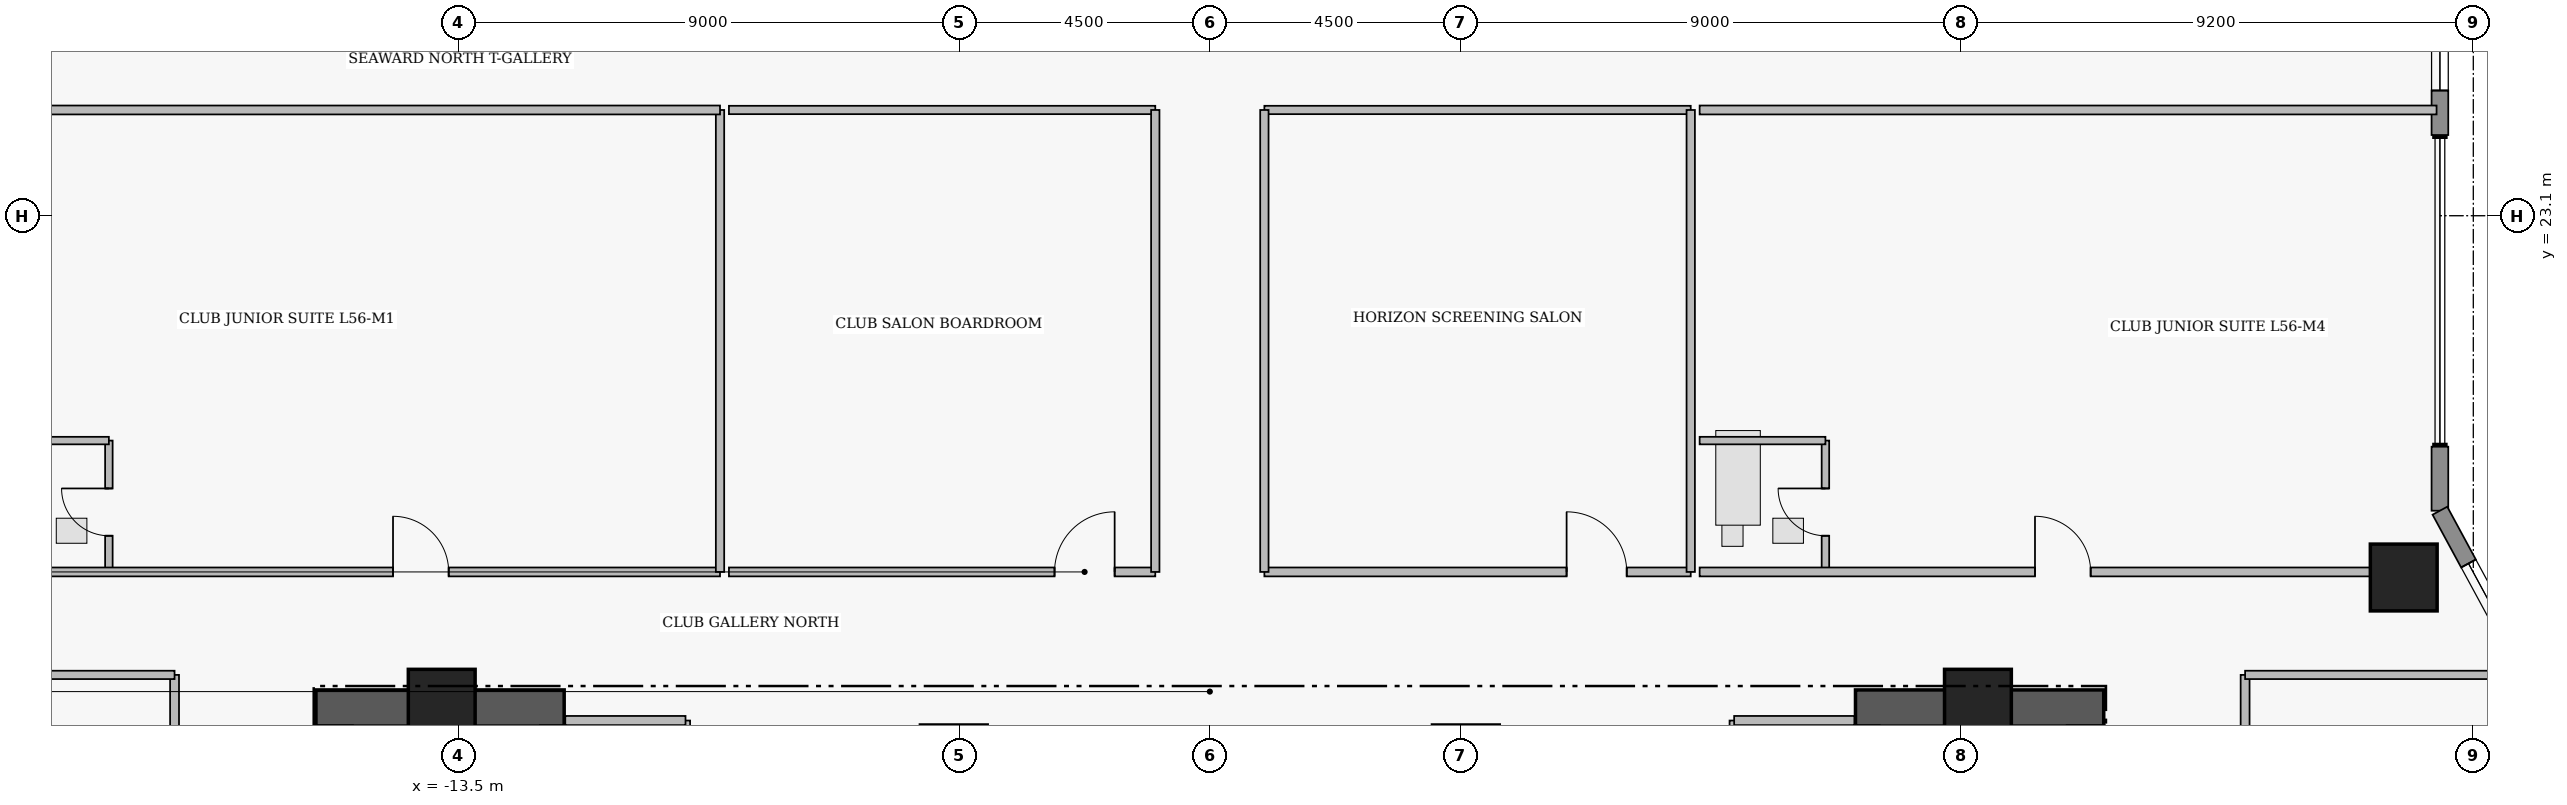
"""IFC4 building model, lengths in metres.
Left out: names, types, materials, properties, quantities, classifications, styles, units other than length and angle.
Written with IfcOpenShell. Run it as: python <this file> out.ifc"""

import sys

from ifc_helpers import new_model, si_unit, direction, frame, frame_2d, origin, origin_2d, place, context, subcontext, project, spatial, rectangle, extrude, element, fill, save


model = new_model("IFC4")
c1 = context("Model", 3, precision=1e-05, world=origin(), true_north=direction((0.0, 1.0)))
c2 = subcontext(c1, "Body", "Model", "MODEL_VIEW")
j1 = project(units=[si_unit("LENGTHUNIT", "METRE"), si_unit("PLANEANGLEUNIT", "RADIAN")], contexts=[c1])
p1 = place(None, origin())
s1 = spatial("IfcSite", under=j1, at=p1, CompositionType="ELEMENT")
p2 = place(p1, origin())
s2 = spatial("IfcBuilding", under=s1, at=p2, CompositionType="ELEMENT")
p3 = place(p2, frame((0.0, 0.0, 222.4)))
s3 = spatial("IfcBuildingStorey", under=s2, at=p3, CompositionType="ELEMENT", Elevation=222.4)
for number, where, z_axis, x_axis in (
    (1, (-16.06, 14.255, 0.0), (0.0, 0.0, 1.0), (1.0, 0.0, 0.0)),
    (2, (11.6, 14.255, 0.0), (0.0, 0.0, 1.0), (1.0, 0.0, 0.0)),
):
    element("IfcWall", number, at=place(p3, frame(where, z_axis=z_axis, x_axis=x_axis)), inside=s3, PredefinedType="SHEAR", context=c2, shape_type="SweptSolid", body=[
        extrude(rectangle(XDim=4.46, YDim=0.65, at=frame_2d((2.23, 0.0))), origin(), (0.0, 0.0, 1.0), 3.56),
    ])
for number, where, z_axis, x_axis in (
    (3, (-13.8, 14.35, 0.0), (0.0, 0.0, 1.0), (1.0, 0.0, 0.0)),
    (4, (-4.6, 13.35, 0.0), (0.0, 0.0, 1.0), (1.0, 0.0, 0.0)),
    (5, (4.6, 13.35, 0.0), (0.0, 0.0, 1.0), (1.0, 0.0, 0.0)),
    (6, (13.8, 14.35, 0.0), (0.0, 0.0, 1.0), (1.0, 0.0, 0.0)),
    (7, (21.45, 16.6, 0.0), (0.0, 0.0, 1.0), (1.0, 0.0, 0.0)),
):
    element("IfcColumn", number, at=place(p3, frame(where, z_axis=z_axis, x_axis=x_axis)), inside=s3, PredefinedType="COLUMN", context=c2, shape_type="SweptSolid", body=[
        extrude(rectangle(XDim=1.2, YDim=1.2, at=origin_2d()), origin(), (0.0, 0.0, 1.0), 3.75),
    ])
p4 = place(p3, frame((22.1, 30.2, 0.0), z_axis=(0.0, 0.0, 1.0), x_axis=(0.0, -1.0, 0.0)))
e8 = element("IfcWall", 8, at=p4, inside=s3, PredefinedType="STANDARD", context=c2, shape_type="SweptSolid", body=[
    extrude(rectangle(XDim=5.65, YDim=0.3, at=frame_2d((2.825, 0.0))), origin(), (0.0, 0.0, 1.0), 3.53),
])
p5 = place(p4, frame((0.935, 0.0, 0.85)))
e9 = element("IfcOpeningElement", 9, at=p5, cuts=e8, PredefinedType="OPENING", context=c2, shape_type="SweptSolid", body=[
    extrude(rectangle(XDim=1.6, YDim=1.8, at=frame_2d((0.8, 0.9))), frame((0.0, 0.16, 0.0), z_axis=(0.0, -1.0, 0.0), x_axis=(1.0, 0.0, 0.0)), (0.0, 0.0, 1.0), 0.32),
])
p6 = place(p4, frame((3.7, 0.0, 0.95)))
e10 = element("IfcOpeningElement", 10, at=p6, cuts=e8, PredefinedType="OPENING", context=c2, shape_type="SweptSolid", body=[
    extrude(rectangle(XDim=1.15, YDim=1.55, at=frame_2d((0.575, 0.775))), frame((0.0, 0.16, 0.0), z_axis=(0.0, -1.0, 0.0), x_axis=(1.0, 0.0, 0.0)), (0.0, 0.0, 1.0), 0.32),
])
p7 = place(p3, frame((22.1, 18.95, 0.0), z_axis=(0.0, 0.0, 1.0), x_axis=(0.0, -1.0, 0.0)))
e11 = element("IfcWall", 11, at=p7, inside=s3, PredefinedType="STANDARD", context=c2, shape_type="SweptSolid", body=[
    extrude(rectangle(XDim=1.15, YDim=0.3, at=frame_2d((0.575, 0.0))), origin(), (0.0, 0.0, 1.0), 3.53),
])
p8 = place(p3, frame((22.1, 17.8, 0.0), z_axis=(0.0, 0.0, 1.0), x_axis=(0.476258655584, -0.879305233114, 0.0)))
e12 = element("IfcWall", 12, at=p8, inside=s3, PredefinedType="STANDARD", context=c2, shape_type="SweptSolid", body=[
    extrude(rectangle(XDim=5.459, YDim=0.3, at=frame_2d((2.729, 0.0))), origin(), (0.0, 0.0, 1.0), 3.53),
])
p9 = place(p8, frame((1.078, 0.0, 1.25)))
e13 = element("IfcOpeningElement", 13, at=p9, cuts=e12, PredefinedType="OPENING", context=c2, shape_type="SweptSolid", body=[
    extrude(rectangle(XDim=1.15, YDim=1.55, at=frame_2d((0.575, 0.775))), frame((0.0, 0.16, 0.0), z_axis=(0.0, -1.0, 0.0), x_axis=(1.0, 0.0, 0.0)), (0.0, 0.0, 1.0), 0.32),
])
p10 = place(p3, frame((-19.78, 16.7, 0.0), z_axis=(0.0, 0.0, 1.0), x_axis=(0.0, 1.0, 0.0)))
e14 = element("IfcWall", 14, at=p10, inside=s3, PredefinedType="PLUMBINGWALL", context=c2, shape_type="SweptSolid", body=[
    extrude(rectangle(XDim=2.36, YDim=0.135, at=frame_2d((1.18, 0.0))), origin(), (0.0, 0.0, 1.0), 3.53),
])
p11 = place(p10, frame((0.65, 0.0, 0.0)))
e15 = element("IfcOpeningElement", 15, at=p11, cuts=e14, PredefinedType="OPENING", context=c2, shape_type="SweptSolid", body=[
    extrude(rectangle(XDim=0.85, YDim=2.1, at=frame_2d((0.425, 1.05))), frame((0.0, 0.077, 0.0), z_axis=(0.0, -1.0, 0.0), x_axis=(1.0, 0.0, 0.0)), (0.0, 0.0, 1.0), 0.155),
])
p12 = place(p3, frame((-22.04, 16.7, 0.0), z_axis=(0.0, 0.0, 1.0), x_axis=(1.0, 0.0, 0.0)))
e16 = element("IfcWall", 16, at=p12, inside=s3, PredefinedType="PARTITIONING", context=c2, shape_type="SweptSolid", body=[
    extrude(rectangle(XDim=13.24, YDim=0.16, at=frame_2d((6.62, 0.0))), origin(), (0.0, 0.0, 1.0), 3.124),
])
p13 = place(p12, frame((7.365, 0.0, 0.0)))
e17 = element("IfcOpeningElement", 17, at=p13, cuts=e16, PredefinedType="OPENING", context=c2, shape_type="SweptSolid", body=[
    extrude(rectangle(XDim=1.0, YDim=2.15, at=frame_2d((0.5, 1.075))), frame((0.0, 0.09, 0.0), z_axis=(0.0, -1.0, 0.0), x_axis=(1.0, 0.0, 0.0)), (0.0, 0.0, 1.0), 0.18),
])
p14 = place(p3, frame((-8.64, 16.7, 0.0), z_axis=(0.0, 0.0, 1.0), x_axis=(1.0, 0.0, 0.0)))
e18 = element("IfcWall", 18, at=p14, inside=s3, PredefinedType="PARTITIONING", context=c2, shape_type="SweptSolid", body=[
    extrude(rectangle(XDim=7.66, YDim=0.16, at=frame_2d((3.83, 0.0))), origin(), (0.0, 0.0, 1.0), 3.124),
])
p15 = place(p14, frame((5.85, 0.0, 0.0)))
e19 = element("IfcOpeningElement", 19, at=p15, cuts=e18, PredefinedType="OPENING", context=c2, shape_type="SweptSolid", body=[
    extrude(rectangle(XDim=1.08, YDim=2.18, at=frame_2d((0.54, 1.09))), frame((0.0, 0.09, 0.0), z_axis=(0.0, -1.0, 0.0), x_axis=(1.0, 0.0, 0.0)), (0.0, 0.0, 1.0), 0.18),
])
p16 = place(p3, frame((0.98, 16.7, 0.0), z_axis=(0.0, 0.0, 1.0), x_axis=(1.0, 0.0, 0.0)))
e20 = element("IfcWall", 20, at=p16, inside=s3, PredefinedType="PARTITIONING", context=c2, shape_type="SweptSolid", body=[
    extrude(rectangle(XDim=7.66, YDim=0.16, at=frame_2d((3.83, 0.0))), origin(), (0.0, 0.0, 1.0), 3.124),
])
p17 = place(p16, frame((5.43, 0.0, 0.0)))
e21 = element("IfcOpeningElement", 21, at=p17, cuts=e20, PredefinedType="OPENING", context=c2, shape_type="SweptSolid", body=[
    extrude(rectangle(XDim=1.08, YDim=2.18, at=frame_2d((0.54, 1.09))), frame((0.0, 0.09, 0.0), z_axis=(0.0, -1.0, 0.0), x_axis=(1.0, 0.0, 0.0)), (0.0, 0.0, 1.0), 0.18),
])
p18 = place(p3, frame((11.06, 16.7, 0.0), z_axis=(0.0, 0.0, 1.0), x_axis=(0.0, 1.0, 0.0)))
e22 = element("IfcWall", 22, at=p18, inside=s3, PredefinedType="PLUMBINGWALL", context=c2, shape_type="SweptSolid", body=[
    extrude(rectangle(XDim=2.36, YDim=0.135, at=frame_2d((1.18, 0.0))), origin(), (0.0, 0.0, 1.0), 3.53),
])
p19 = place(p18, frame((0.65, 0.0, 0.0)))
e23 = element("IfcOpeningElement", 23, at=p19, cuts=e22, PredefinedType="OPENING", context=c2, shape_type="SweptSolid", body=[
    extrude(rectangle(XDim=0.85, YDim=2.1, at=frame_2d((0.425, 1.05))), frame((0.0, 0.077, 0.0), z_axis=(0.0, -1.0, 0.0), x_axis=(1.0, 0.0, 0.0)), (0.0, 0.0, 1.0), 0.155),
])
p20 = place(p3, frame((8.8, 16.7, 0.0), z_axis=(0.0, 0.0, 1.0), x_axis=(1.0, 0.0, 0.0)))
e24 = element("IfcWall", 24, at=p20, inside=s3, PredefinedType="PARTITIONING", context=c2, shape_type="SweptSolid", body=[
    extrude(rectangle(XDim=13.24, YDim=0.16, at=frame_2d((6.62, 0.0))), origin(), (0.0, 0.0, 1.0), 3.124),
])
p21 = place(p20, frame((6.025, 0.0, 0.0)))
e25 = element("IfcOpeningElement", 25, at=p21, cuts=e24, PredefinedType="OPENING", context=c2, shape_type="SweptSolid", body=[
    extrude(rectangle(XDim=1.0, YDim=2.15, at=frame_2d((0.5, 1.075))), frame((0.0, 0.09, 0.0), z_axis=(0.0, -1.0, 0.0), x_axis=(1.0, 0.0, 0.0)), (0.0, 0.0, 1.0), 0.18),
])
p22 = place(p3, frame((18.6, 7.96, 0.0), z_axis=(0.0, 0.0, 1.0), x_axis=(0.0, 1.0, 0.0)))
e26 = element("IfcWall", 26, at=p22, inside=s3, PredefinedType="PARTITIONING", context=c2, shape_type="SweptSolid", body=[
    extrude(rectangle(XDim=6.89, YDim=0.16, at=frame_2d((3.445, 0.0))), origin(), (0.0, 0.0, 1.0), 3.53),
])
p23 = place(p22, frame((2.985, 0.0, 0.0)))
e27 = element("IfcOpeningElement", 27, at=p23, cuts=e26, PredefinedType="OPENING", context=c2, shape_type="SweptSolid", body=[
    extrude(rectangle(XDim=0.92, YDim=2.12, at=frame_2d((0.46, 1.06))), frame((0.0, 0.09, 0.0), z_axis=(0.0, -1.0, 0.0), x_axis=(1.0, 0.0, 0.0)), (0.0, 0.0, 1.0), 0.18),
])
p24 = place(p3, frame((-18.6, 10.18, 0.0), z_axis=(0.0, 0.0, 1.0), x_axis=(0.0, 1.0, 0.0)))
e28 = element("IfcWall", 28, at=p24, inside=s3, PredefinedType="PARTITIONING", context=c2, shape_type="SweptSolid", body=[
    extrude(rectangle(XDim=4.67, YDim=0.16, at=frame_2d((2.335, 0.0))), origin(), (0.0, 0.0, 1.0), 3.53),
])
p25 = place(p24, frame((1.86, 0.0, 0.0)))
e29 = element("IfcOpeningElement", 29, at=p25, cuts=e28, PredefinedType="OPENING", context=c2, shape_type="SweptSolid", body=[
    extrude(rectangle(XDim=0.95, YDim=2.15, at=frame_2d((0.475, 1.075))), frame((0.0, 0.09, 0.0), z_axis=(0.0, -1.0, 0.0), x_axis=(1.0, 0.0, 0.0)), (0.0, 0.0, 1.0), 0.18),
])
p26 = place(p3, frame((-9.42, 11.07, 0.0), z_axis=(0.0, 0.0, 1.0), x_axis=(0.0, 1.0, 0.0)))
e30 = element("IfcWall", 30, at=p26, inside=s3, PredefinedType="PARTITIONING", context=c2, shape_type="SweptSolid", body=[
    extrude(rectangle(XDim=2.96, YDim=0.165, at=frame_2d((1.48, 0.0))), origin(), (0.0, 0.0, 1.0), 3.53),
])
p27 = place(p3, frame((-11.58, 14.03, 0.0), z_axis=(0.0, 0.0, 1.0), x_axis=(1.0, 0.0, 0.0)))
e31 = element("IfcWall", 31, at=p27, inside=s3, PredefinedType="PARTITIONING", context=c2, shape_type="SweptSolid", body=[
    extrude(rectangle(XDim=2.16, YDim=0.165, at=frame_2d((1.08, 0.0))), origin(), (0.0, 0.0, 1.0), 3.53),
])
p28 = place(p3, frame((9.42, 11.07, 0.0), z_axis=(0.0, 0.0, 1.0), x_axis=(0.0, 1.0, 0.0)))
e32 = element("IfcWall", 32, at=p28, inside=s3, PredefinedType="PARTITIONING", context=c2, shape_type="SweptSolid", body=[
    extrude(rectangle(XDim=2.96, YDim=0.165, at=frame_2d((1.48, 0.0))), origin(), (0.0, 0.0, 1.0), 3.53),
])
p29 = place(p3, frame((9.42, 14.03, 0.0), z_axis=(0.0, 0.0, 1.0), x_axis=(1.0, 0.0, 0.0)))
e33 = element("IfcWall", 33, at=p29, inside=s3, PredefinedType="PARTITIONING", context=c2, shape_type="SweptSolid", body=[
    extrude(rectangle(XDim=2.16, YDim=0.165, at=frame_2d((1.08, 0.0))), origin(), (0.0, 0.0, 1.0), 3.53),
])
p30 = place(p3, frame((-22.04, 19.06, 0.0), z_axis=(0.0, 0.0, 1.0), x_axis=(1.0, 0.0, 0.0)))
e34 = element("IfcWall", 34, at=p30, inside=s3, PredefinedType="PLUMBINGWALL", context=c2, shape_type="SweptSolid", body=[
    extrude(rectangle(XDim=2.26, YDim=0.135, at=frame_2d((1.13, 0.0))), origin(), (0.0, 0.0, 1.0), 3.53),
])
p31 = place(p3, frame((-8.8, 16.7, 0.0), z_axis=(0.0, 0.0, 1.0), x_axis=(0.0, 1.0, 0.0)))
e35 = element("IfcWall", 35, at=p31, inside=s3, PredefinedType="PARTITIONING", context=c2, shape_type="SweptSolid", body=[
    extrude(rectangle(XDim=8.3, YDim=0.15, at=frame_2d((4.15, 0.0))), origin(), (0.0, 0.0, 1.0), 3.53),
])
p32 = place(p3, frame((-22.04, 25.0, 0.0), z_axis=(0.0, 0.0, 1.0), x_axis=(1.0, 0.0, 0.0)))
e36 = element("IfcWall", 36, at=p32, inside=s3, PredefinedType="PARTITIONING", context=c2, shape_type="SweptSolid", body=[
    extrude(rectangle(XDim=13.24, YDim=0.16, at=frame_2d((6.62, 0.0))), origin(), (0.0, 0.0, 1.0), 3.124),
])
p33 = place(p3, frame((-8.64, 25.0, 0.0), z_axis=(0.0, 0.0, 1.0), x_axis=(1.0, 0.0, 0.0)))
e37 = element("IfcWall", 37, at=p33, inside=s3, PredefinedType="PARTITIONING", context=c2, shape_type="SweptSolid", body=[
    extrude(rectangle(XDim=7.66, YDim=0.15, at=frame_2d((3.83, 0.0))), origin(), (0.0, 0.0, 1.0), 3.124),
])
p34 = place(p3, frame((-0.98, 16.7, 0.0), z_axis=(0.0, 0.0, 1.0), x_axis=(0.0, 1.0, 0.0)))
e38 = element("IfcWall", 38, at=p34, inside=s3, PredefinedType="PARTITIONING", context=c2, shape_type="SweptSolid", body=[
    extrude(rectangle(XDim=8.3, YDim=0.15, at=frame_2d((4.15, 0.0))), origin(), (0.0, 0.0, 1.0), 3.53),
])
p35 = place(p3, frame((0.98, 25.0, 0.0), z_axis=(0.0, 0.0, 1.0), x_axis=(1.0, 0.0, 0.0)))
e39 = element("IfcWall", 39, at=p35, inside=s3, PredefinedType="PARTITIONING", context=c2, shape_type="SweptSolid", body=[
    extrude(rectangle(XDim=7.66, YDim=0.15, at=frame_2d((3.83, 0.0))), origin(), (0.0, 0.0, 1.0), 3.124),
])
for number, where, z_axis, x_axis in (
    (40, (0.98, 16.7, 0.0), (0.0, 0.0, 1.0), (0.0, 1.0, 0.0)),
    (41, (8.64, 16.7, 0.0), (0.0, 0.0, 1.0), (0.0, 1.0, 0.0)),
):
    element("IfcWall", number, at=place(p3, frame(where, z_axis=z_axis, x_axis=x_axis)), inside=s3, PredefinedType="PARTITIONING", context=c2, shape_type="SweptSolid", body=[
        extrude(rectangle(XDim=8.3, YDim=0.15, at=frame_2d((4.15, 0.0))), origin(), (0.0, 0.0, 1.0), 3.53),
    ])
p36 = place(p3, frame((8.8, 19.06, 0.0), z_axis=(0.0, 0.0, 1.0), x_axis=(1.0, 0.0, 0.0)))
e42 = element("IfcWall", 42, at=p36, inside=s3, PredefinedType="PLUMBINGWALL", context=c2, shape_type="SweptSolid", body=[
    extrude(rectangle(XDim=2.26, YDim=0.135, at=frame_2d((1.13, 0.0))), origin(), (0.0, 0.0, 1.0), 3.124),
])
p37 = place(p3, frame((8.8, 25.0, 0.0), z_axis=(0.0, 0.0, 1.0), x_axis=(1.0, 0.0, 0.0)))
e43 = element("IfcWall", 43, at=p37, inside=s3, PredefinedType="PARTITIONING", context=c2, shape_type="SweptSolid", body=[
    extrude(rectangle(XDim=13.24, YDim=0.16, at=frame_2d((6.62, 0.0))), origin(), (0.0, 0.0, 1.0), 3.124),
])
for number, where, z_axis, x_axis in (
    (44, (18.6, 14.85, 0.0), (0.0, 0.0, 1.0), (1.0, 0.0, 0.0)),
    (45, (-23.638, 14.85, 0.0), (0.0, 0.0, 1.0), (1.0, 0.0, 0.0)),
):
    element("IfcWall", number, at=place(p3, frame(where, z_axis=z_axis, x_axis=x_axis)), inside=s3, PredefinedType="PARTITIONING", context=c2, shape_type="SweptSolid", body=[
        extrude(rectangle(XDim=5.038, YDim=0.15, at=frame_2d((2.519, 0.0))), origin(), (0.0, 0.0, 1.0), 3.53),
    ])
p38 = place(p6, origin())
e46 = element("IfcWindow", 46, at=p38, inside=s3, PartitioningType="SINGLE_PANEL", PredefinedType="WINDOW", context=c2, shape_type="SweptSolid", body=[
    extrude(rectangle(XDim=1.15, YDim=1.55, at=frame_2d((0.575, 0.775))), frame((0.0, 0.03, 0.0), z_axis=(0.0, -1.0, 0.0), x_axis=(1.0, 0.0, 0.0)), (0.0, 0.0, 1.0), 0.06),
])
fill(e10, e46)
p39 = place(p9, origin())
e47 = element("IfcWindow", 47, at=p39, inside=s3, PartitioningType="SINGLE_PANEL", PredefinedType="WINDOW", context=c2, shape_type="SweptSolid", body=[
    extrude(rectangle(XDim=1.15, YDim=1.55, at=frame_2d((0.575, 0.775))), frame((0.0, 0.03, 0.0), z_axis=(0.0, -1.0, 0.0), x_axis=(1.0, 0.0, 0.0)), (0.0, 0.0, 1.0), 0.06),
])
fill(e13, e47)
p40 = place(p11, origin())
e48 = element("IfcDoor", 48, at=p40, inside=s3, OperationType="SINGLE_SWING_RIGHT", PredefinedType="DOOR", context=c2, shape_type="SweptSolid", body=[
    extrude(rectangle(XDim=0.85, YDim=2.1, at=frame_2d((0.425, 1.05))), frame((0.0, 0.025, 0.0), z_axis=(0.0, -1.0, 0.0), x_axis=(1.0, 0.0, 0.0)), (0.0, 0.0, 1.0), 0.05),
])
fill(e15, e48)
p41 = place(p13, origin())
e49 = element("IfcDoor", 49, at=p41, inside=s3, OperationType="SINGLE_SWING_LEFT", PredefinedType="DOOR", context=c2, shape_type="SweptSolid", body=[
    extrude(rectangle(XDim=1.0, YDim=2.15, at=frame_2d((0.5, 1.075))), frame((0.0, 0.025, 0.0), z_axis=(0.0, -1.0, 0.0), x_axis=(1.0, 0.0, 0.0)), (0.0, 0.0, 1.0), 0.05),
])
fill(e17, e49)
p42 = place(p15, origin())
e50 = element("IfcDoor", 50, at=p42, inside=s3, OperationType="SINGLE_SWING_RIGHT", PredefinedType="DOOR", context=c2, shape_type="SweptSolid", body=[
    extrude(rectangle(XDim=1.08, YDim=2.18, at=frame_2d((0.54, 1.09))), frame((0.0, 0.025, 0.0), z_axis=(0.0, -1.0, 0.0), x_axis=(1.0, 0.0, 0.0)), (0.0, 0.0, 1.0), 0.05),
])
fill(e19, e50)
p43 = place(p17, origin())
e51 = element("IfcDoor", 51, at=p43, inside=s3, OperationType="SINGLE_SWING_LEFT", PredefinedType="DOOR", context=c2, shape_type="SweptSolid", body=[
    extrude(rectangle(XDim=1.08, YDim=2.18, at=frame_2d((0.54, 1.09))), frame((0.0, 0.025, 0.0), z_axis=(0.0, -1.0, 0.0), x_axis=(1.0, 0.0, 0.0)), (0.0, 0.0, 1.0), 0.05),
])
fill(e21, e51)
p44 = place(p19, origin())
e52 = element("IfcDoor", 52, at=p44, inside=s3, OperationType="SINGLE_SWING_RIGHT", PredefinedType="DOOR", context=c2, shape_type="SweptSolid", body=[
    extrude(rectangle(XDim=0.85, YDim=2.1, at=frame_2d((0.425, 1.05))), frame((0.0, 0.025, 0.0), z_axis=(0.0, -1.0, 0.0), x_axis=(1.0, 0.0, 0.0)), (0.0, 0.0, 1.0), 0.05),
])
fill(e23, e52)
p45 = place(p21, origin())
e53 = element("IfcDoor", 53, at=p45, inside=s3, OperationType="SINGLE_SWING_LEFT", PredefinedType="DOOR", context=c2, shape_type="SweptSolid", body=[
    extrude(rectangle(XDim=1.0, YDim=2.15, at=frame_2d((0.5, 1.075))), frame((0.0, 0.025, 0.0), z_axis=(0.0, -1.0, 0.0), x_axis=(1.0, 0.0, 0.0)), (0.0, 0.0, 1.0), 0.05),
])
fill(e25, e53)
save(model, sys.argv[1])
